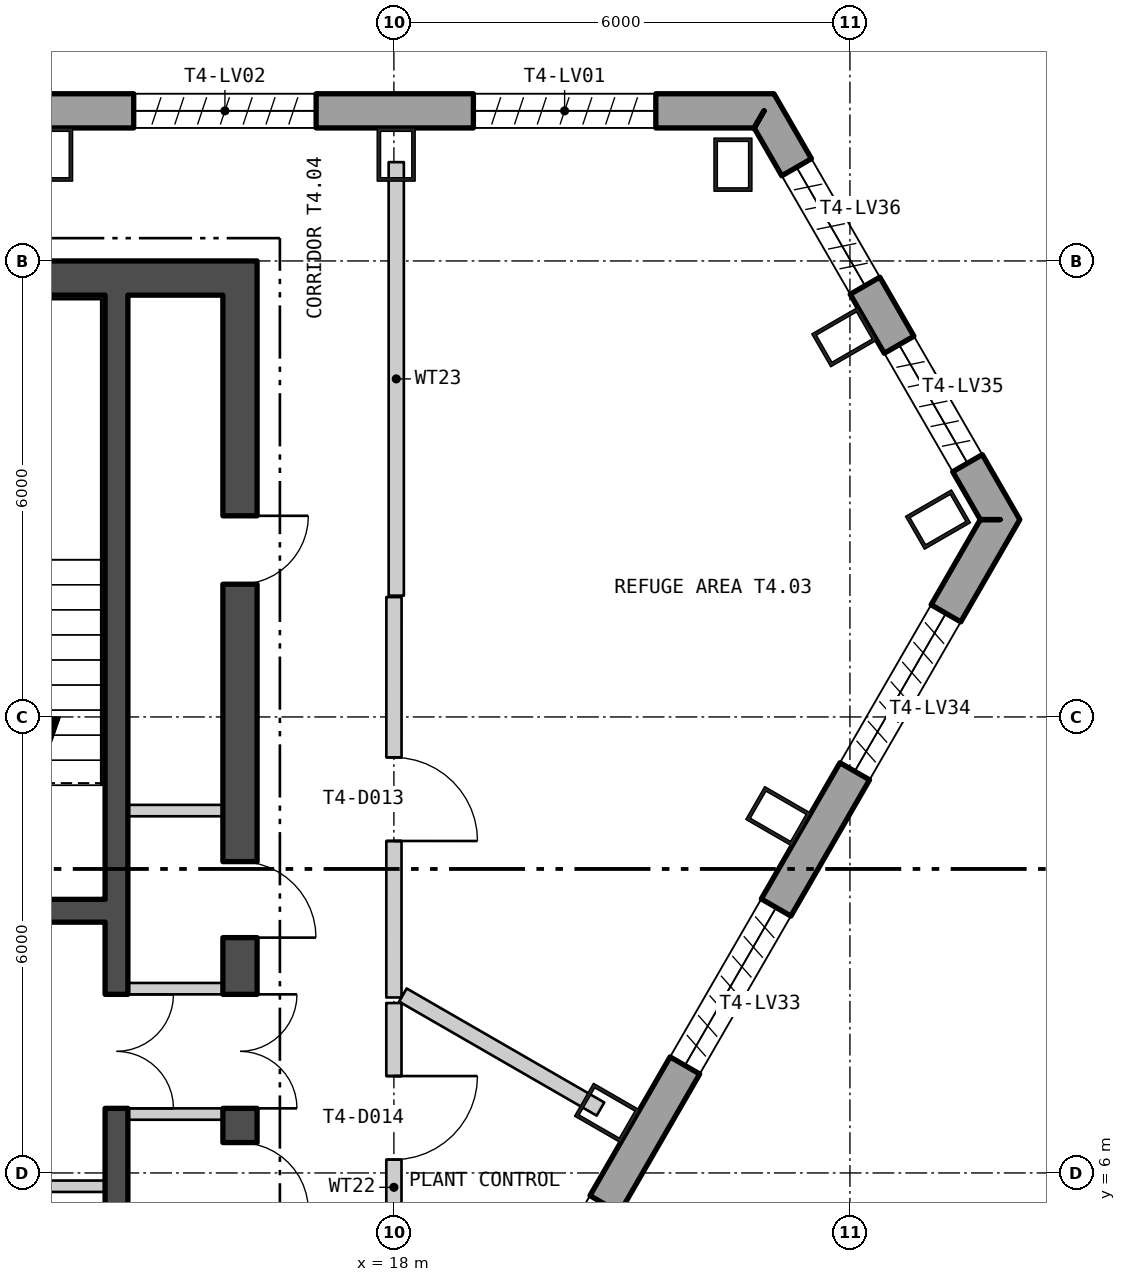
"""IFC4 building model, lengths in metres.
Left out: names, types, materials, properties, quantities, classifications, styles, units other than length and angle.
Written with IfcOpenShell. Run it as: python <this file> out.ifc"""

import sys

from ifc_helpers import new_model, si_unit, direction, frame, frame_2d, origin, origin_2d, place, context, subcontext, project, spatial, polyline, rectangle, hollow_rectangle, outline, extrude, element, fill, save


model = new_model("IFC4")
c1 = context("Model", 3, precision=1e-05, world=origin(), true_north=direction((0.0, 1.0)))
c2 = subcontext(c1, "Body", "Model", "MODEL_VIEW")
j1 = project(units=[si_unit("LENGTHUNIT", "METRE"), si_unit("PLANEANGLEUNIT", "RADIAN")], contexts=[c1])
p1 = place(None, origin())
s1 = spatial("IfcSite", under=j1, at=p1, CompositionType="ELEMENT")
p2 = place(p1, origin())
s2 = spatial("IfcBuilding", under=s1, at=p2, CompositionType="ELEMENT")
p3 = place(p2, frame((0.0, 0.0, 239.4)))
s3 = spatial("IfcBuildingStorey", under=s2, at=p3, CompositionType="ELEMENT", Elevation=239.4)
for number, where, z_axis, x_axis in (
    (1, (22.461, 19.267, 0.0), (0.0, 0.0, 1.0), (-1.0, 0.0, 0.0)),
    (2, (18.03, 19.4, 0.0), (0.0, 0.0, 1.0), (-1.0, 0.0, 0.0)),
    (3, (13.523, 19.4, 0.0), (0.0, 0.0, 1.0), (-1.0, 0.0, 0.0)),
    (4, (20.804, 6.789, 0.0), (0.0, 0.0, 1.0), (0.5, 0.866, 0.0)),
    (5, (23.057, 10.693, 0.0), (0.0, 0.0, 1.0), (0.5, 0.866, 0.0)),
    (6, (25.158, 14.597, 0.0), (0.0, 0.0, 1.0), (-0.5, 0.866, 0.0)),
    (7, (23.925, 16.998, 0.0), (0.0, 0.0, 1.0), (-0.5, 0.866, 0.0)),
):
    element("IfcColumn", number, at=place(p3, frame(where, z_axis=z_axis, x_axis=x_axis)), inside=s3, PredefinedType="COLUMN", context=c2, shape_type="SweptSolid", body=[
        extrude(hollow_rectangle(XDim=0.5, YDim=0.7, WallThickness=0.045, at=origin_2d()), origin(), (0.0, 0.0, 1.0), 6.0),
    ])
p4 = place(p3, frame((22.87, 19.975, -0.4), z_axis=(0.0, 0.0, 1.0), x_axis=(-1.0, 0.0, 0.0)))
e8 = element("IfcWall", 8, at=p4, inside=s3, PredefinedType="SOLIDWALL", context=c2, shape_type="SweptSolid", body=[
    extrude(outline(polyline([(-0.13, -0.225), (45.87, -0.225), (45.61, 0.225), (0.13, 0.225), (-0.13, -0.225)])), origin(), (0.0, 0.0, 1.0), 6.0),
])
p5 = place(p4, frame((1.424, 0.0, 1.6)))
e9 = element("IfcOpeningElement", 9, at=p5, cuts=e8, PredefinedType="OPENING", context=c2, shape_type="SweptSolid", body=[
    extrude(rectangle(XDim=2.4, YDim=3.6, at=frame_2d((1.2, 1.8))), frame((0.0, 0.235, 0.0), z_axis=(0.0, -1.0, 0.0), x_axis=(1.0, 0.0, 0.0)), (0.0, 0.0, 1.0), 0.47),
])
p6 = place(p4, frame((5.893, 0.0, 1.6)))
e10 = element("IfcOpeningElement", 10, at=p6, cuts=e8, PredefinedType="OPENING", context=c2, shape_type="SweptSolid", body=[
    extrude(rectangle(XDim=2.4, YDim=3.6, at=frame_2d((1.2, 1.8))), frame((0.0, 0.235, 0.0), z_axis=(0.0, -1.0, 0.0), x_axis=(1.0, 0.0, 0.0)), (0.0, 0.0, 1.0), 0.47),
])
p7 = place(p4, frame((10.401, 0.0, 1.6)))
e11 = element("IfcOpeningElement", 11, at=p7, cuts=e8, PredefinedType="OPENING", context=c2, shape_type="SweptSolid", body=[
    extrude(rectangle(XDim=2.4, YDim=3.6, at=frame_2d((1.2, 1.8))), frame((0.0, 0.235, 0.0), z_axis=(0.0, -1.0, 0.0), x_axis=(1.0, 0.0, 0.0)), (0.0, 0.0, 1.0), 0.47),
])
p8 = place(p4, frame((14.909, 0.0, 1.6)))
e12 = element("IfcOpeningElement", 12, at=p8, cuts=e8, PredefinedType="OPENING", context=c2, shape_type="SweptSolid", body=[
    extrude(rectangle(XDim=2.4, YDim=3.6, at=frame_2d((1.2, 1.8))), frame((0.0, 0.235, 0.0), z_axis=(0.0, -1.0, 0.0), x_axis=(1.0, 0.0, 0.0)), (0.0, 0.0, 1.0), 0.47),
])
p9 = place(p4, frame((19.416, 0.0, 1.6)))
e13 = element("IfcOpeningElement", 13, at=p9, cuts=e8, PredefinedType="OPENING", context=c2, shape_type="SweptSolid", body=[
    extrude(rectangle(XDim=2.4, YDim=3.6, at=frame_2d((1.2, 1.8))), frame((0.0, 0.235, 0.0), z_axis=(0.0, -1.0, 0.0), x_axis=(1.0, 0.0, 0.0)), (0.0, 0.0, 1.0), 0.47),
])
p10 = place(p4, frame((23.924, 0.0, 1.6)))
e14 = element("IfcOpeningElement", 14, at=p10, cuts=e8, PredefinedType="OPENING", context=c2, shape_type="SweptSolid", body=[
    extrude(rectangle(XDim=2.4, YDim=3.6, at=frame_2d((1.2, 1.8))), frame((0.0, 0.235, 0.0), z_axis=(0.0, -1.0, 0.0), x_axis=(1.0, 0.0, 0.0)), (0.0, 0.0, 1.0), 0.47),
])
p11 = place(p4, frame((28.431, 0.0, 1.6)))
e15 = element("IfcOpeningElement", 15, at=p11, cuts=e8, PredefinedType="OPENING", context=c2, shape_type="SweptSolid", body=[
    extrude(rectangle(XDim=2.4, YDim=3.6, at=frame_2d((1.2, 1.8))), frame((0.0, 0.235, 0.0), z_axis=(0.0, -1.0, 0.0), x_axis=(1.0, 0.0, 0.0)), (0.0, 0.0, 1.0), 0.47),
])
p12 = place(p4, frame((32.939, 0.0, 1.6)))
e16 = element("IfcOpeningElement", 16, at=p12, cuts=e8, PredefinedType="OPENING", context=c2, shape_type="SweptSolid", body=[
    extrude(rectangle(XDim=2.4, YDim=3.6, at=frame_2d((1.2, 1.8))), frame((0.0, 0.235, 0.0), z_axis=(0.0, -1.0, 0.0), x_axis=(1.0, 0.0, 0.0)), (0.0, 0.0, 1.0), 0.47),
])
p13 = place(p4, frame((37.447, 0.0, 1.6)))
e17 = element("IfcOpeningElement", 17, at=p13, cuts=e8, PredefinedType="OPENING", context=c2, shape_type="SweptSolid", body=[
    extrude(rectangle(XDim=2.4, YDim=3.6, at=frame_2d((1.2, 1.8))), frame((0.0, 0.235, 0.0), z_axis=(0.0, -1.0, 0.0), x_axis=(1.0, 0.0, 0.0)), (0.0, 0.0, 1.0), 0.47),
])
p14 = place(p4, frame((41.916, 0.0, 1.6)))
e18 = element("IfcOpeningElement", 18, at=p14, cuts=e8, PredefinedType="OPENING", context=c2, shape_type="SweptSolid", body=[
    extrude(rectangle(XDim=2.4, YDim=3.6, at=frame_2d((1.2, 1.8))), frame((0.0, 0.235, 0.0), z_axis=(0.0, -1.0, 0.0), x_axis=(1.0, 0.0, 0.0)), (0.0, 0.0, 1.0), 0.47),
])
p15 = place(p3, frame((3.105, -25.015, -0.18), z_axis=(0.0, 0.0, 1.0), x_axis=(0.499999764979, 0.866025539474, 0.0)))
e19 = element("IfcWall", 19, at=p15, inside=s3, PredefinedType="SOLIDWALL", context=c2, shape_type="SweptSolid", body=[
    extrude(outline(polyline([(-0.13, -0.225), (45.87, -0.225), (45.61, 0.225), (0.13, 0.225), (-0.13, -0.225)])), origin(), (0.0, 0.0, 1.0), 6.0),
])
p16 = place(p15, frame((1.424, 0.0, 1.38)))
e20 = element("IfcOpeningElement", 20, at=p16, cuts=e19, PredefinedType="OPENING", context=c2, shape_type="SweptSolid", body=[
    extrude(rectangle(XDim=2.4, YDim=3.6, at=frame_2d((1.2, 1.8))), frame((0.0, 0.235, 0.0), z_axis=(0.0, -1.0, 0.0), x_axis=(1.0, 0.0, 0.0)), (0.0, 0.0, 1.0), 0.47),
])
p17 = place(p15, frame((5.893, 0.0, 1.38)))
e21 = element("IfcOpeningElement", 21, at=p17, cuts=e19, PredefinedType="OPENING", context=c2, shape_type="SweptSolid", body=[
    extrude(rectangle(XDim=2.4, YDim=3.6, at=frame_2d((1.2, 1.8))), frame((0.0, 0.235, 0.0), z_axis=(0.0, -1.0, 0.0), x_axis=(1.0, 0.0, 0.0)), (0.0, 0.0, 1.0), 0.47),
])
p18 = place(p15, frame((10.401, 0.0, 1.38)))
e22 = element("IfcOpeningElement", 22, at=p18, cuts=e19, PredefinedType="OPENING", context=c2, shape_type="SweptSolid", body=[
    extrude(rectangle(XDim=2.4, YDim=3.6, at=frame_2d((1.2, 1.8))), frame((0.0, 0.235, 0.0), z_axis=(0.0, -1.0, 0.0), x_axis=(1.0, 0.0, 0.0)), (0.0, 0.0, 1.0), 0.47),
])
p19 = place(p15, frame((14.909, 0.0, 1.38)))
e23 = element("IfcOpeningElement", 23, at=p19, cuts=e19, PredefinedType="OPENING", context=c2, shape_type="SweptSolid", body=[
    extrude(rectangle(XDim=2.4, YDim=3.6, at=frame_2d((1.2, 1.8))), frame((0.0, 0.235, 0.0), z_axis=(0.0, -1.0, 0.0), x_axis=(1.0, 0.0, 0.0)), (0.0, 0.0, 1.0), 0.47),
])
p20 = place(p15, frame((19.416, 0.0, 1.38)))
e24 = element("IfcOpeningElement", 24, at=p20, cuts=e19, PredefinedType="OPENING", context=c2, shape_type="SweptSolid", body=[
    extrude(rectangle(XDim=2.4, YDim=3.6, at=frame_2d((1.2, 1.8))), frame((0.0, 0.235, 0.0), z_axis=(0.0, -1.0, 0.0), x_axis=(1.0, 0.0, 0.0)), (0.0, 0.0, 1.0), 0.47),
])
p21 = place(p15, frame((23.924, 0.0, 1.38)))
e25 = element("IfcOpeningElement", 25, at=p21, cuts=e19, PredefinedType="OPENING", context=c2, shape_type="SweptSolid", body=[
    extrude(rectangle(XDim=2.4, YDim=3.6, at=frame_2d((1.2, 1.8))), frame((0.0, 0.235, 0.0), z_axis=(0.0, -1.0, 0.0), x_axis=(1.0, 0.0, 0.0)), (0.0, 0.0, 1.0), 0.47),
])
p22 = place(p15, frame((28.431, 0.0, 1.38)))
e26 = element("IfcOpeningElement", 26, at=p22, cuts=e19, PredefinedType="OPENING", context=c2, shape_type="SweptSolid", body=[
    extrude(rectangle(XDim=2.4, YDim=3.6, at=frame_2d((1.2, 1.8))), frame((0.0, 0.235, 0.0), z_axis=(0.0, -1.0, 0.0), x_axis=(1.0, 0.0, 0.0)), (0.0, 0.0, 1.0), 0.47),
])
p23 = place(p15, frame((32.939, 0.0, 1.38)))
e27 = element("IfcOpeningElement", 27, at=p23, cuts=e19, PredefinedType="OPENING", context=c2, shape_type="SweptSolid", body=[
    extrude(rectangle(XDim=2.4, YDim=3.6, at=frame_2d((1.2, 1.8))), frame((0.0, 0.235, 0.0), z_axis=(0.0, -1.0, 0.0), x_axis=(1.0, 0.0, 0.0)), (0.0, 0.0, 1.0), 0.47),
])
p24 = place(p15, frame((37.447, 0.0, 1.38)))
e28 = element("IfcOpeningElement", 28, at=p24, cuts=e19, PredefinedType="OPENING", context=c2, shape_type="SweptSolid", body=[
    extrude(rectangle(XDim=2.4, YDim=3.6, at=frame_2d((1.2, 1.8))), frame((0.0, 0.235, 0.0), z_axis=(0.0, -1.0, 0.0), x_axis=(1.0, 0.0, 0.0)), (0.0, 0.0, 1.0), 0.47),
])
p25 = place(p15, frame((41.916, 0.0, 1.38)))
e29 = element("IfcOpeningElement", 29, at=p25, cuts=e19, PredefinedType="OPENING", context=c2, shape_type="SweptSolid", body=[
    extrude(rectangle(XDim=2.4, YDim=3.6, at=frame_2d((1.2, 1.8))), frame((0.0, 0.235, 0.0), z_axis=(0.0, -1.0, 0.0), x_axis=(1.0, 0.0, 0.0)), (0.0, 0.0, 1.0), 0.47),
])
p26 = place(p3, frame((25.975, 14.597, -0.4), z_axis=(0.0, 0.0, 1.0), x_axis=(-0.499999369857, 0.866025767597, 0.0)))
e30 = element("IfcWall", 30, at=p26, inside=s3, PredefinedType="SOLIDWALL", context=c2, shape_type="SweptSolid", body=[
    extrude(outline(polyline([(-0.13, -0.225), (6.34, -0.225), (6.08, 0.225), (0.13, 0.225), (-0.13, -0.225)])), origin(), (0.0, 0.0, 1.0), 6.0),
])
p27 = place(p26, frame((0.857, 0.0, 1.6)))
e31 = element("IfcOpeningElement", 31, at=p27, cuts=e30, PredefinedType="OPENING", context=c2, shape_type="SweptSolid", body=[
    extrude(rectangle(XDim=1.8, YDim=3.6, at=frame_2d((0.9, 1.8))), frame((0.0, 0.235, 0.0), z_axis=(0.0, -1.0, 0.0), x_axis=(1.0, 0.0, 0.0)), (0.0, 0.0, 1.0), 0.47),
])
p28 = place(p26, frame((3.553, 0.0, 1.6)))
e32 = element("IfcOpeningElement", 32, at=p28, cuts=e30, PredefinedType="OPENING", context=c2, shape_type="SweptSolid", body=[
    extrude(rectangle(XDim=1.8, YDim=3.6, at=frame_2d((0.9, 1.8))), frame((0.0, 0.235, 0.0), z_axis=(0.0, -1.0, 0.0), x_axis=(1.0, 0.0, 0.0)), (0.0, 0.0, 1.0), 0.47),
])
p29 = place(p3, frame((-16.2, 17.775, 0.0), z_axis=(0.0, 0.0, 1.0), x_axis=(1.0, 0.0, 0.0)))
e33 = element("IfcWall", 33, at=p29, inside=s3, PredefinedType="SHEAR", context=c2, shape_type="SweptSolid", body=[
    extrude(rectangle(XDim=32.4, YDim=0.45, at=frame_2d((16.2, 0.0))), origin(), (0.0, 0.0, 1.0), 5.8),
])
p30 = place(p3, frame((15.975, 2.45, 0.0), z_axis=(0.0, 0.0, 1.0), x_axis=(0.0, 1.0, 0.0)))
e34 = element("IfcWall", 34, at=p30, inside=s3, PredefinedType="SHEAR", context=c2, shape_type="SweptSolid", body=[
    extrude(rectangle(XDim=15.1, YDim=0.45, at=frame_2d((7.55, 0.0))), origin(), (0.0, 0.0, 1.0), 5.8),
])
p31 = place(p30, frame((4.4, 0.0, 0.0)))
e35 = element("IfcOpeningElement", 35, at=p31, cuts=e34, PredefinedType="OPENING", context=c2, shape_type="SweptSolid", body=[
    extrude(rectangle(XDim=1.5, YDim=2.1, at=frame_2d((0.75, 1.05))), frame((0.0, 0.235, 0.0), z_axis=(0.0, -1.0, 0.0), x_axis=(1.0, 0.0, 0.0)), (0.0, 0.0, 1.0), 0.47),
])
p32 = place(p30, frame((1.086, 0.0, 0.0)))
e36 = element("IfcOpeningElement", 36, at=p32, cuts=e34, PredefinedType="OPENING", context=c2, shape_type="SweptSolid", body=[
    extrude(rectangle(XDim=0.9, YDim=2.1, at=frame_2d((0.45, 1.05))), frame((0.0, 0.235, 0.0), z_axis=(0.0, -1.0, 0.0), x_axis=(1.0, 0.0, 0.0)), (0.0, 0.0, 1.0), 0.47),
])
p33 = place(p30, frame((3.05, 0.0, 0.0)))
e37 = element("IfcOpeningElement", 37, at=p33, cuts=e34, PredefinedType="OPENING", context=c2, shape_type="SweptSolid", body=[
    extrude(rectangle(XDim=0.9, YDim=2.1, at=frame_2d((0.45, 1.05))), frame((0.0, 0.235, 0.0), z_axis=(0.0, -1.0, 0.0), x_axis=(1.0, 0.0, 0.0)), (0.0, 0.0, 1.0), 0.47),
])
p34 = place(p30, frame((6.646, 0.0, 0.0)))
e38 = element("IfcOpeningElement", 38, at=p34, cuts=e34, PredefinedType="OPENING", context=c2, shape_type="SweptSolid", body=[
    extrude(rectangle(XDim=1.0, YDim=2.1, at=frame_2d((0.5, 1.05))), frame((0.0, 0.235, 0.0), z_axis=(0.0, -1.0, 0.0), x_axis=(1.0, 0.0, 0.0)), (0.0, 0.0, 1.0), 0.47),
])
p35 = place(p30, frame((11.296, 0.0, 0.0)))
e39 = element("IfcOpeningElement", 39, at=p35, cuts=e34, PredefinedType="OPENING", context=c2, shape_type="SweptSolid", body=[
    extrude(rectangle(XDim=0.9, YDim=2.1, at=frame_2d((0.45, 1.05))), frame((0.0, 0.235, 0.0), z_axis=(0.0, -1.0, 0.0), x_axis=(1.0, 0.0, 0.0)), (0.0, 0.0, 1.0), 0.47),
])
p36 = place(p3, frame((14.35, 2.45, 0.0), z_axis=(0.0, 0.0, 1.0), x_axis=(0.0, 1.0, 0.0)))
e40 = element("IfcWall", 40, at=p36, inside=s3, PredefinedType="SHEAR", context=c2, shape_type="SweptSolid", body=[
    extrude(rectangle(XDim=15.1, YDim=0.3, at=frame_2d((7.55, 0.0))), origin(), (0.0, 0.0, 1.0), 5.8),
])
p37 = place(p36, frame((4.4, 0.0, 0.0)))
e41 = element("IfcOpeningElement", 41, at=p37, cuts=e40, PredefinedType="OPENING", context=c2, shape_type="SweptSolid", body=[
    extrude(rectangle(XDim=1.5, YDim=2.1, at=frame_2d((0.75, 1.05))), frame((0.0, 0.16, 0.0), z_axis=(0.0, -1.0, 0.0), x_axis=(1.0, 0.0, 0.0)), (0.0, 0.0, 1.0), 0.32),
])
p38 = place(p3, frame((11.0, 9.45, 0.0), z_axis=(0.0, 0.0, 1.0), x_axis=(1.0, 0.0, 0.0)))
e42 = element("IfcWall", 42, at=p38, inside=s3, PredefinedType="SHEAR", context=c2, shape_type="SweptSolid", body=[
    extrude(rectangle(XDim=3.2, YDim=0.3, at=frame_2d((1.6, 0.0))), origin(), (0.0, 0.0, 1.0), 5.8),
])
p39 = place(p38, frame((1.0, 0.0, 0.0)))
e43 = element("IfcOpeningElement", 43, at=p39, cuts=e42, PredefinedType="OPENING", context=c2, shape_type="SweptSolid", body=[
    extrude(rectangle(XDim=1.2, YDim=2.1, at=frame_2d((0.6, 1.05))), frame((0.0, 0.16, 0.0), z_axis=(0.0, -1.0, 0.0), x_axis=(1.0, 0.0, 0.0)), (0.0, 0.0, 1.0), 0.32),
])
p40 = place(p3, frame((11.0, 5.825, 0.0), z_axis=(0.0, 0.0, 1.0), x_axis=(1.0, 0.0, 0.0)))
e44 = element("IfcWall", 44, at=p40, inside=s3, PredefinedType="PARTITIONING", context=c2, shape_type="SweptSolid", body=[
    extrude(rectangle(XDim=3.2, YDim=0.15, at=frame_2d((1.6, 0.0))), origin(), (0.0, 0.0, 1.0), 5.8),
])
for number, where, z_axis, x_axis in (
    (45, (14.5, 6.775, 0.0), (0.0, 0.0, 1.0), (1.0, 0.0, 0.0)),
    (46, (14.5, 8.425, 0.0), (0.0, 0.0, 1.0), (1.0, 0.0, 0.0)),
    (47, (14.5, 10.768, 0.0), (0.0, 0.0, 1.0), (1.0, 0.0, 0.0)),
):
    element("IfcWall", number, at=place(p3, frame(where, z_axis=z_axis, x_axis=x_axis)), inside=s3, PredefinedType="PARTITIONING", context=c2, shape_type="SweptSolid", body=[
        extrude(rectangle(XDim=1.25, YDim=0.15, at=frame_2d((0.625, 0.0))), origin(), (0.0, 0.0, 1.0), 5.8),
    ])
p41 = place(p3, frame((18.0, 8.309, 0.0), z_axis=(0.0, 0.0, 1.0), x_axis=(0.000189825357, 0.999999981983, 0.0)))
e48 = element("IfcWall", 48, at=p41, inside=s3, PredefinedType="PARTITIONING", context=c2, shape_type="SweptSolid", body=[
    extrude(rectangle(XDim=5.268, YDim=0.2, at=frame_2d((2.634, 0.0))), origin(), (0.0, 0.0, 1.0), 5.8),
])
p42 = place(p41, frame((2.059, 0.0, 0.0)))
e49 = element("IfcOpeningElement", 49, at=p42, cuts=e48, PredefinedType="OPENING", context=c2, shape_type="SweptSolid", body=[
    extrude(rectangle(XDim=1.1, YDim=2.1, at=frame_2d((0.55, 1.05))), frame((0.0, 0.11, 0.0), z_axis=(0.0, -1.0, 0.0), x_axis=(1.0, 0.0, 0.0)), (0.0, 0.0, 1.0), 0.22),
])
p43 = place(p3, frame((18.0, 3.386, 0.0), z_axis=(0.0, 0.0, 1.0), x_axis=(0.0, 1.0, 0.0)))
e50 = element("IfcWall", 50, at=p43, inside=s3, PredefinedType="PARTITIONING", context=c2, shape_type="SweptSolid", body=[
    extrude(rectangle(XDim=4.85, YDim=0.2, at=frame_2d((2.425, 0.0))), origin(), (0.0, 0.0, 1.0), 5.8),
])
p44 = place(p43, frame((2.789, 0.0, 0.0)))
e51 = element("IfcOpeningElement", 51, at=p44, cuts=e50, PredefinedType="OPENING", context=c2, shape_type="SweptSolid", body=[
    extrude(rectangle(XDim=1.1, YDim=2.1, at=frame_2d((0.55, 1.05))), frame((0.0, 0.11, 0.0), z_axis=(0.0, -1.0, 0.0), x_axis=(1.0, 0.0, 0.0)), (0.0, 0.0, 1.0), 0.22),
])
p45 = place(p3, frame((18.031, 13.596, 0.0), z_axis=(0.0, 0.0, 1.0), x_axis=(0.0, 1.0, 0.0)))
e52 = element("IfcWall", 52, at=p45, inside=s3, PredefinedType="PARTITIONING", context=c2, shape_type="SweptSolid", body=[
    extrude(rectangle(XDim=5.704, YDim=0.2, at=frame_2d((2.852, 0.0))), origin(), (0.0, 0.0, 1.0), 5.8),
])
p46 = place(p3, frame((18.118, 8.341, 0.0), z_axis=(0.0, 0.0, 1.0), x_axis=(0.866185586049, -0.49972245349, 0.0)))
e53 = element("IfcWall", 53, at=p46, inside=s3, PredefinedType="PARTITIONING", context=c2, shape_type="SweptSolid", body=[
    extrude(rectangle(XDim=3.002, YDim=0.2, at=frame_2d((1.501, 0.0))), origin(), (0.0, 0.0, 1.0), 5.8),
])
p47 = place(p37, origin())
e54 = element("IfcDoor", 54, at=p47, inside=s3, OperationType="DOUBLE_DOOR_SINGLE_SWING", PredefinedType="DOOR", context=c2, shape_type="SweptSolid", body=[
    extrude(rectangle(XDim=1.5, YDim=2.1, at=frame_2d((0.75, 1.05))), frame((0.0, 0.025, 0.0), z_axis=(0.0, -1.0, 0.0), x_axis=(1.0, 0.0, 0.0)), (0.0, 0.0, 1.0), 0.05),
])
fill(e41, e54)
p48 = place(p31, origin())
e55 = element("IfcDoor", 55, at=p48, inside=s3, OperationType="DOUBLE_DOOR_SINGLE_SWING", PredefinedType="DOOR", context=c2, shape_type="SweptSolid", body=[
    extrude(rectangle(XDim=1.5, YDim=2.1, at=frame_2d((0.75, 1.05))), frame((0.0, 0.025, 0.0), z_axis=(0.0, -1.0, 0.0), x_axis=(1.0, 0.0, 0.0)), (0.0, 0.0, 1.0), 0.05),
])
fill(e35, e55)
p49 = place(p33, origin())
e56 = element("IfcDoor", 56, at=p49, inside=s3, OperationType="SINGLE_SWING_LEFT", PredefinedType="DOOR", context=c2, shape_type="SweptSolid", body=[
    extrude(rectangle(XDim=0.9, YDim=2.1, at=frame_2d((0.45, 1.05))), frame((0.0, 0.025, 0.0), z_axis=(0.0, -1.0, 0.0), x_axis=(1.0, 0.0, 0.0)), (0.0, 0.0, 1.0), 0.05),
])
fill(e37, e56)
p50 = place(p34, origin())
e57 = element("IfcDoor", 57, at=p50, inside=s3, OperationType="SINGLE_SWING_LEFT", PredefinedType="DOOR", context=c2, shape_type="SweptSolid", body=[
    extrude(rectangle(XDim=1.0, YDim=2.1, at=frame_2d((0.5, 1.05))), frame((0.0, 0.025, 0.0), z_axis=(0.0, -1.0, 0.0), x_axis=(1.0, 0.0, 0.0)), (0.0, 0.0, 1.0), 0.05),
])
fill(e38, e57)
p51 = place(p35, origin())
e58 = element("IfcDoor", 58, at=p51, inside=s3, OperationType="SINGLE_SWING_RIGHT", PredefinedType="DOOR", context=c2, shape_type="SweptSolid", body=[
    extrude(rectangle(XDim=0.9, YDim=2.1, at=frame_2d((0.45, 1.05))), frame((0.0, 0.025, 0.0), z_axis=(0.0, -1.0, 0.0), x_axis=(1.0, 0.0, 0.0)), (0.0, 0.0, 1.0), 0.05),
])
fill(e39, e58)
p52 = place(p42, origin())
e59 = element("IfcDoor", 59, at=p52, inside=s3, OperationType="SINGLE_SWING_LEFT", PredefinedType="DOOR", context=c2, shape_type="SweptSolid", body=[
    extrude(rectangle(XDim=1.1, YDim=2.1, at=frame_2d((0.55, 1.05))), frame((0.0, 0.025, 0.0), z_axis=(0.0, -1.0, 0.0), x_axis=(1.0, 0.0, 0.0)), (0.0, 0.0, 1.0), 0.05),
])
fill(e49, e59)
p53 = place(p44, origin())
e60 = element("IfcDoor", 60, at=p53, inside=s3, OperationType="SINGLE_SWING_RIGHT", PredefinedType="DOOR", context=c2, shape_type="SweptSolid", body=[
    extrude(rectangle(XDim=1.1, YDim=2.1, at=frame_2d((0.55, 1.05))), frame((0.0, 0.025, 0.0), z_axis=(0.0, -1.0, 0.0), x_axis=(1.0, 0.0, 0.0)), (0.0, 0.0, 1.0), 0.05),
])
fill(e51, e60)
save(model, sys.argv[1])
